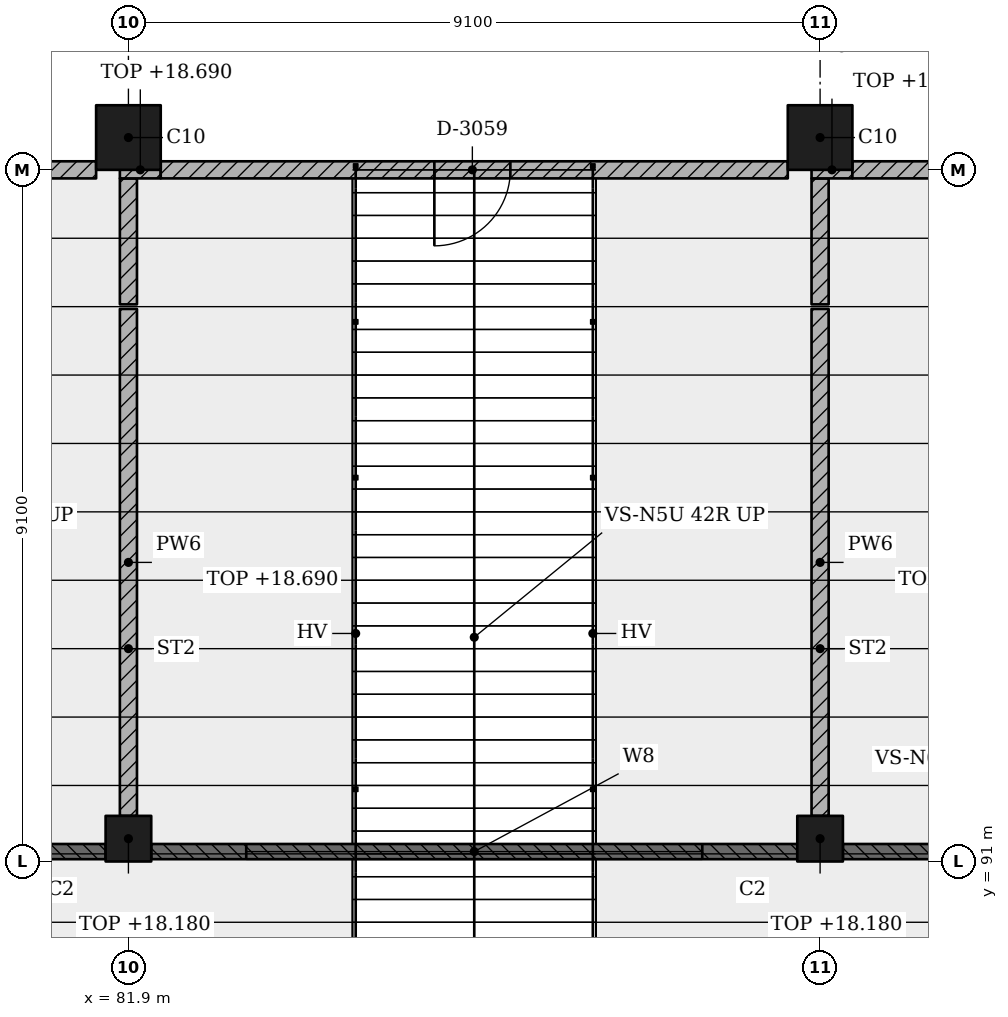
"""IFC4 building model, lengths in metres.
Left out: names, types, materials, properties, quantities, classifications, styles, units other than length and angle.
Written with IfcOpenShell. Run it as: python <this file> out.ifc"""

import sys

from ifc_helpers import new_model, si_unit, direction, frame, frame_2d, origin, origin_2d, place, context, subcontext, project, spatial, rectangle, extrude, element, fill, save


model = new_model("IFC4")
c1 = context("Model", 3, precision=1e-05, world=origin(), true_north=direction((0.0, 1.0)))
c2 = subcontext(c1, "Body", "Model", "MODEL_VIEW")
j1 = project(units=[si_unit("LENGTHUNIT", "METRE"), si_unit("PLANEANGLEUNIT", "RADIAN")], contexts=[c1])
p1 = place(None, origin())
s1 = spatial("IfcSite", under=j1, at=p1, CompositionType="ELEMENT")
p2 = place(p1, origin())
s2 = spatial("IfcBuilding", under=s1, at=p2, CompositionType="ELEMENT")
p3 = place(p2, frame((0.0, 0.0, 15.47)))
s3 = spatial("IfcBuildingStorey", under=s2, at=p3, CompositionType="ELEMENT", Elevation=15.47)
p4 = place(p3, frame((81.9, 91.3, 0.0), z_axis=(0.0, 0.0, 1.0), x_axis=(1.0, 0.0, 0.0)))
e1 = element("IfcColumn", 1, at=p4, inside=s3, PredefinedType="COLUMN", context=c2, shape_type="SweptSolid", body=[
    extrude(rectangle(XDim=0.6, YDim=0.6, at=origin_2d()), origin(), (0.0, 0.0, 1.0), 2.71),
])
p5 = place(p3, frame((81.9, 100.525, 0.0), z_axis=(0.0, 0.0, 1.0), x_axis=(1.0, 0.0, 0.0)))
e2 = element("IfcColumn", 2, at=p5, inside=s3, PredefinedType="COLUMN", context=c2, shape_type="SweptSolid", body=[
    extrude(rectangle(XDim=0.85, YDim=0.85, at=origin_2d()), origin(), (0.0, 0.0, 1.0), 4.55),
])
p6 = place(p3, frame((91.0, 91.3, 0.0), z_axis=(0.0, 0.0, 1.0), x_axis=(1.0, 0.0, 0.0)))
e3 = element("IfcColumn", 3, at=p6, inside=s3, PredefinedType="COLUMN", context=c2, shape_type="SweptSolid", body=[
    extrude(rectangle(XDim=0.6, YDim=0.6, at=origin_2d()), origin(), (0.0, 0.0, 1.0), 2.71),
])
p7 = place(p3, frame((91.0, 100.525, 0.0), z_axis=(0.0, 0.0, 1.0), x_axis=(1.0, 0.0, 0.0)))
e4 = element("IfcColumn", 4, at=p7, inside=s3, PredefinedType="COLUMN", context=c2, shape_type="SweptSolid", body=[
    extrude(rectangle(XDim=0.85, YDim=0.85, at=origin_2d()), origin(), (0.0, 0.0, 1.0), 4.55),
])
p8 = place(p3, frame((81.475, 100.1, 0.0), z_axis=(0.0, 0.0, 1.0), x_axis=(-1.0, 0.0, 0.0)))
e5 = element("IfcWall", 5, at=p8, inside=s3, PredefinedType="PARTITIONING", context=c2, shape_type="SweptSolid", body=[
    extrude(rectangle(XDim=8.25, YDim=0.225, at=frame_2d((4.125, 0.0))), origin(), (0.0, 0.0, 1.0), 3.6),
])
p9 = place(p8, frame((3.65, 0.0, 0.0)))
e6 = element("IfcOpeningElement", 6, at=p9, cuts=e5, PredefinedType="OPENING", context=c2, shape_type="SweptSolid", body=[
    extrude(rectangle(XDim=1.0, YDim=2.4, at=frame_2d((0.5, 1.2))), frame((0.0, 0.123, 0.0), z_axis=(0.0, -1.0, 0.0), x_axis=(1.0, 0.0, 0.0)), (0.0, 0.0, 1.0), 0.245),
])
p10 = place(p3, frame((81.9, 98.27, 0.0), z_axis=(0.0, 0.0, 1.0), x_axis=(0.0, -1.0, 0.0)))
e7 = element("IfcWall", 7, at=p10, inside=s3, PredefinedType="PARTITIONING", context=c2, shape_type="SweptSolid", body=[
    extrude(rectangle(XDim=6.67, YDim=0.225, at=frame_2d((3.335, 0.0))), origin(), (0.0, 0.0, 1.0), 3.22),
])
p11 = place(p3, frame((81.9, 99.988, 0.0), z_axis=(0.0, 0.0, 1.0), x_axis=(0.0, -1.0, 0.0)))
e8 = element("IfcWall", 8, at=p11, inside=s3, PredefinedType="PARTITIONING", context=c2, shape_type="SweptSolid", body=[
    extrude(rectangle(XDim=1.657, YDim=0.225, at=frame_2d((0.829, 0.0))), origin(), (0.0, 0.0, 1.0), 3.22),
])
p12 = place(p3, frame((82.325, 100.1, 0.0), z_axis=(0.0, 0.0, 1.0), x_axis=(-1.0, 0.0, 0.0)))
e9 = element("IfcWall", 9, at=p12, inside=s3, PredefinedType="PARTITIONING", context=c2, shape_type="SweptSolid", body=[
    extrude(rectangle(XDim=0.537, YDim=0.225, at=frame_2d((0.269, 0.0))), origin(), (0.0, 0.0, 1.0), 3.22),
])
p13 = place(p3, frame((90.575, 100.1, 0.0), z_axis=(0.0, 0.0, 1.0), x_axis=(-1.0, 0.0, 0.0)))
e10 = element("IfcWall", 10, at=p13, inside=s3, PredefinedType="PARTITIONING", context=c2, shape_type="SweptSolid", body=[
    extrude(rectangle(XDim=8.25, YDim=0.225, at=frame_2d((4.125, 0.0))), origin(), (0.0, 0.0, 1.0), 3.6),
])
p14 = place(p13, frame((3.65, 0.0, 0.0)))
e11 = element("IfcOpeningElement", 11, at=p14, cuts=e10, PredefinedType="OPENING", context=c2, shape_type="SweptSolid", body=[
    extrude(rectangle(XDim=1.0, YDim=2.4, at=frame_2d((0.5, 1.2))), frame((0.0, 0.123, 0.0), z_axis=(0.0, -1.0, 0.0), x_axis=(1.0, 0.0, 0.0)), (0.0, 0.0, 1.0), 0.245),
])
p15 = place(p3, frame((91.0, 98.27, 0.0), z_axis=(0.0, 0.0, 1.0), x_axis=(0.0, -1.0, 0.0)))
e12 = element("IfcWall", 12, at=p15, inside=s3, PredefinedType="PARTITIONING", context=c2, shape_type="SweptSolid", body=[
    extrude(rectangle(XDim=6.67, YDim=0.225, at=frame_2d((3.335, 0.0))), origin(), (0.0, 0.0, 1.0), 3.22),
])
p16 = place(p3, frame((91.0, 99.988, 0.0), z_axis=(0.0, 0.0, 1.0), x_axis=(0.0, -1.0, 0.0)))
e13 = element("IfcWall", 13, at=p16, inside=s3, PredefinedType="PARTITIONING", context=c2, shape_type="SweptSolid", body=[
    extrude(rectangle(XDim=1.657, YDim=0.225, at=frame_2d((0.829, 0.0))), origin(), (0.0, 0.0, 1.0), 3.22),
])
p17 = place(p3, frame((91.425, 100.1, 0.0), z_axis=(0.0, 0.0, 1.0), x_axis=(-1.0, 0.0, 0.0)))
e14 = element("IfcWall", 14, at=p17, inside=s3, PredefinedType="PARTITIONING", context=c2, shape_type="SweptSolid", body=[
    extrude(rectangle(XDim=0.538, YDim=0.225, at=frame_2d((0.269, 0.0))), origin(), (0.0, 0.0, 1.0), 3.22),
])
p18 = place(p3, frame((99.675, 100.1, 0.0), z_axis=(0.0, 0.0, 1.0), x_axis=(-1.0, 0.0, 0.0)))
e15 = element("IfcWall", 15, at=p18, inside=s3, PredefinedType="PARTITIONING", context=c2, shape_type="SweptSolid", body=[
    extrude(rectangle(XDim=8.25, YDim=0.225, at=frame_2d((4.125, 0.0))), origin(), (0.0, 0.0, 1.0), 3.6),
])
p19 = place(p18, frame((3.65, 0.0, 0.0)))
e16 = element("IfcOpeningElement", 16, at=p19, cuts=e15, PredefinedType="OPENING", context=c2, shape_type="SweptSolid", body=[
    extrude(rectangle(XDim=1.0, YDim=2.4, at=frame_2d((0.5, 1.2))), frame((0.0, 0.123, 0.0), z_axis=(0.0, -1.0, 0.0), x_axis=(1.0, 0.0, 0.0)), (0.0, 0.0, 1.0), 0.245),
])
p20 = place(p3, frame((81.6, 91.13, 0.0), z_axis=(0.0, 0.0, 1.0), x_axis=(-1.0, 0.0, 0.0)))
e17 = element("IfcWall", 17, at=p20, inside=s3, PredefinedType="PARTITIONING", context=c2, shape_type="SweptSolid", body=[
    extrude(rectangle(XDim=8.5, YDim=0.2, at=frame_2d((4.25, 0.0))), origin(), (0.0, 0.0, 1.0), 2.71),
])
p21 = place(p20, frame((1.25, 0.0, 1.1)))
e18 = element("IfcOpeningElement", 18, at=p21, cuts=e17, PredefinedType="OPENING", context=c2, shape_type="SweptSolid", body=[
    extrude(rectangle(XDim=6.0, YDim=1.3, at=frame_2d((3.0, 0.65))), frame((0.0, 0.11, 0.0), z_axis=(0.0, -1.0, 0.0), x_axis=(1.0, 0.0, 0.0)), (0.0, 0.0, 1.0), 0.22),
])
p22 = place(p3, frame((90.7, 91.13, 0.0), z_axis=(0.0, 0.0, 1.0), x_axis=(-1.0, 0.0, 0.0)))
e19 = element("IfcWall", 19, at=p22, inside=s3, PredefinedType="PARTITIONING", context=c2, shape_type="SweptSolid", body=[
    extrude(rectangle(XDim=8.5, YDim=0.2, at=frame_2d((4.25, 0.0))), origin(), (0.0, 0.0, 1.0), 2.71),
])
p23 = place(p22, frame((1.25, 0.0, 1.1)))
e20 = element("IfcOpeningElement", 20, at=p23, cuts=e19, PredefinedType="OPENING", context=c2, shape_type="SweptSolid", body=[
    extrude(rectangle(XDim=6.0, YDim=1.3, at=frame_2d((3.0, 0.65))), frame((0.0, 0.11, 0.0), z_axis=(0.0, -1.0, 0.0), x_axis=(1.0, 0.0, 0.0)), (0.0, 0.0, 1.0), 0.22),
])
p24 = place(p3, frame((99.8, 91.13, 0.0), z_axis=(0.0, 0.0, 1.0), x_axis=(-1.0, 0.0, 0.0)))
e21 = element("IfcWall", 21, at=p24, inside=s3, PredefinedType="PARTITIONING", context=c2, shape_type="SweptSolid", body=[
    extrude(rectangle(XDim=8.5, YDim=0.2, at=frame_2d((4.25, 0.0))), origin(), (0.0, 0.0, 1.0), 2.71),
])
p25 = place(p24, frame((1.25, 0.0, 1.1)))
e22 = element("IfcOpeningElement", 22, at=p25, cuts=e21, PredefinedType="OPENING", context=c2, shape_type="SweptSolid", body=[
    extrude(rectangle(XDim=6.0, YDim=1.3, at=frame_2d((3.0, 0.65))), frame((0.0, 0.11, 0.0), z_axis=(0.0, -1.0, 0.0), x_axis=(1.0, 0.0, 0.0)), (0.0, 0.0, 1.0), 0.22),
])
p26 = place(p23, origin())
e23 = element("IfcWindow", 23, at=p26, inside=s3, PartitioningType="SINGLE_PANEL", PredefinedType="WINDOW", context=c2, shape_type="SweptSolid", body=[
    extrude(rectangle(XDim=6.0, YDim=1.3, at=frame_2d((3.0, 0.65))), frame((0.0, 0.03, 0.0), z_axis=(0.0, -1.0, 0.0), x_axis=(1.0, 0.0, 0.0)), (0.0, 0.0, 1.0), 0.06),
])
fill(e20, e23)
p27 = place(p14, origin())
e24 = element("IfcDoor", 24, at=p27, inside=s3, OperationType="SINGLE_SWING_LEFT", PredefinedType="DOOR", context=c2, shape_type="SweptSolid", body=[
    extrude(rectangle(XDim=1.0, YDim=2.4, at=frame_2d((0.5, 1.2))), frame((0.0, 0.025, 0.0), z_axis=(0.0, -1.0, 0.0), x_axis=(1.0, 0.0, 0.0)), (0.0, 0.0, 1.0), 0.05),
])
fill(e11, e24)
save(model, sys.argv[1])
